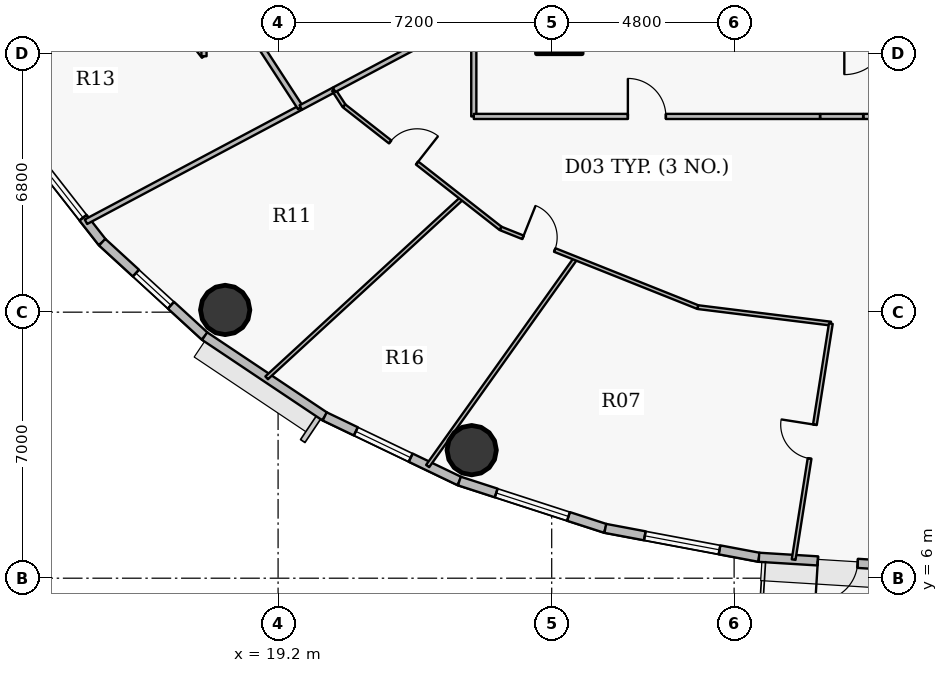
"""IFC4 building model, lengths in metres.
Left out: names, types, materials, properties, quantities, classifications, styles, units other than length and angle.
Written with IfcOpenShell. Run it as: python <this file> out.ifc"""

import sys

from ifc_helpers import new_model, si_unit, direction, frame, frame_2d, origin, origin_2d, place, context, subcontext, project, spatial, rectangle, hollow_circle, extrude, source, transform, mapped, element, fill, save


model = new_model("IFC4")
c1 = context("Model", 3, precision=1e-05, world=origin(), true_north=direction((0.0, 1.0)))
c2 = subcontext(c1, "Body", "Model", "MODEL_VIEW")
j1 = project(units=[si_unit("LENGTHUNIT", "METRE"), si_unit("PLANEANGLEUNIT", "RADIAN")], contexts=[c1])
p1 = place(None, origin())
s1 = spatial("IfcSite", under=j1, at=p1, CompositionType="ELEMENT")
p2 = place(p1, origin())
s2 = spatial("IfcBuilding", under=s1, at=p2, CompositionType="ELEMENT")
p3 = place(p2, frame((0.0, 0.0, 201.15)))
s3 = spatial("IfcBuildingStorey", under=s2, at=p3, CompositionType="ELEMENT", Elevation=201.15)
p4 = place(p3, frame((26.6, 20.4, 0.0), z_axis=(0.0, 0.0, 1.0), x_axis=(1.0, 0.0, 0.0)))
e1 = element("IfcColumn", 1, at=p4, inside=s3, PredefinedType="COLUMN", context=c2, shape_type="SweptSolid", body=[
    extrude(rectangle(XDim=1.2, YDim=1.2, at=origin_2d()), origin(), (0.0, 0.0, 1.0), 3.75),
])
for number, where, z_axis, x_axis in (
    (2, (17.808, 13.058, 0.0), (0.0, 0.0, 1.0), (1.0, 0.0, 0.0)),
    (3, (24.294, 9.369, 0.0), (0.0, 0.0, 1.0), (1.0, 0.0, 0.0)),
):
    element("IfcColumn", number, at=place(p3, frame(where, z_axis=z_axis, x_axis=x_axis)), inside=s3, PredefinedType="COLUMN", context=c2, shape_type="SweptSolid", body=[
        extrude(hollow_circle(Radius=0.65, WallThickness=0.04, at=origin_2d()), origin(), (0.0, 0.0, 1.0), 3.75),
    ])
p5 = place(p3, frame((14.572, 14.842, 0.0), z_axis=(0.0, 0.0, 1.0), x_axis=(-0.616287674549, 0.787521112224, 0.0)))
e4 = element("IfcWall", 4, at=p5, inside=s3, PredefinedType="SOLIDWALL", context=c2, shape_type="SweptSolid", body=[
    extrude(rectangle(XDim=3.517, YDim=0.24, at=frame_2d((1.759, 0.0))), origin(), (0.0, 0.0, 1.0), 3.45),
])
p6 = place(p5, frame((0.819, 0.0, 0.9)))
e5 = element("IfcOpeningElement", 5, at=p6, cuts=e4, PredefinedType="OPENING", context=c2, shape_type="SweptSolid", body=[
    extrude(rectangle(XDim=2.0, YDim=1.75, at=origin_2d()), frame((1.0, 0.13, 0.875), z_axis=(0.0, -1.0, 0.0), x_axis=(1.0, 0.0, 0.0)), (0.0, 0.0, 1.0), 0.26),
])
p7 = place(p3, frame((17.268, 12.369, 0.0), z_axis=(0.0, 0.0, 1.0), x_axis=(-0.737076565834, 0.675809245349, 0.0)))
e6 = element("IfcWall", 6, at=p7, inside=s3, PredefinedType="SOLIDWALL", context=c2, shape_type="SweptSolid", body=[
    extrude(rectangle(XDim=3.658, YDim=0.24, at=frame_2d((1.829, 0.0))), origin(), (0.0, 0.0, 1.0), 3.45),
])
p8 = place(p7, frame((1.204, 0.0, 0.9)))
e7 = element("IfcOpeningElement", 7, at=p8, cuts=e6, PredefinedType="OPENING", context=c2, shape_type="SweptSolid", body=[
    extrude(rectangle(XDim=1.25, YDim=1.65, at=origin_2d()), frame((0.625, 0.13, 0.825), z_axis=(0.0, -1.0, 0.0), x_axis=(1.0, 0.0, 0.0)), (0.0, 0.0, 1.0), 0.26),
])
p9 = place(p3, frame((20.427, 10.257, 0.0), z_axis=(0.0, 0.0, 1.0), x_axis=(-0.831228998277, 0.555930168657, 0.0)))
e8 = element("IfcWall", 8, at=p9, inside=s3, PredefinedType="SOLIDWALL", context=c2, shape_type="SweptSolid", body=[
    extrude(rectangle(XDim=3.8, YDim=0.24, at=frame_2d((1.9, 0.0))), origin(), (0.0, 0.0, 1.0), 3.45),
])
p10 = place(p3, frame((23.97, 8.556, 0.0), z_axis=(0.0, 0.0, 1.0), x_axis=(-0.901564733809, 0.432644231155, 0.0)))
e9 = element("IfcWall", 9, at=p10, inside=s3, PredefinedType="SOLIDWALL", context=c2, shape_type="SweptSolid", body=[
    extrude(rectangle(XDim=3.93, YDim=0.24, at=frame_2d((1.965, 0.0))), origin(), (0.0, 0.0, 1.0), 3.45),
])
p11 = place(p10, frame((1.421, 0.0, 0.9)))
e10 = element("IfcOpeningElement", 10, at=p11, cuts=e9, PredefinedType="OPENING", context=c2, shape_type="SweptSolid", body=[
    extrude(rectangle(XDim=1.6, YDim=1.75, at=origin_2d()), frame((0.8, 0.13, 0.875), z_axis=(0.0, -1.0, 0.0), x_axis=(1.0, 0.0, 0.0)), (0.0, 0.0, 1.0), 0.26),
])
p12 = place(p3, frame((27.811, 7.311, 0.0), z_axis=(0.0, 0.0, 1.0), x_axis=(-0.951209870236, 0.30854462038, 0.0)))
e11 = element("IfcWall", 11, at=p12, inside=s3, PredefinedType="SOLIDWALL", context=c2, shape_type="SweptSolid", body=[
    extrude(rectangle(XDim=4.038, YDim=0.24, at=frame_2d((2.019, 0.0))), origin(), (0.0, 0.0, 1.0), 3.45),
])
p13 = place(p12, frame((1.019, 0.0, 0.9)))
e12 = element("IfcOpeningElement", 12, at=p13, cuts=e11, PredefinedType="OPENING", context=c2, shape_type="SweptSolid", body=[
    extrude(rectangle(XDim=2.0, YDim=1.75, at=origin_2d()), frame((1.0, 0.13, 0.875), z_axis=(0.0, -1.0, 0.0), x_axis=(1.0, 0.0, 0.0)), (0.0, 0.0, 1.0), 0.26),
])
p14 = place(p3, frame((31.854, 6.551, 0.0), z_axis=(0.0, 0.0, 1.0), x_axis=(-0.982788108205, 0.184736391573, 0.0)))
e13 = element("IfcWall", 13, at=p14, inside=s3, PredefinedType="SOLIDWALL", context=c2, shape_type="SweptSolid", body=[
    extrude(rectangle(XDim=4.114, YDim=0.24, at=frame_2d((2.057, 0.0))), origin(), (0.0, 0.0, 1.0), 3.45),
])
p15 = place(p14, frame((1.057, 0.0, 0.9)))
e14 = element("IfcOpeningElement", 14, at=p15, cuts=e13, PredefinedType="OPENING", context=c2, shape_type="SweptSolid", body=[
    extrude(rectangle(XDim=2.0, YDim=1.75, at=origin_2d()), frame((1.0, 0.13, 0.875), z_axis=(0.0, -1.0, 0.0), x_axis=(1.0, 0.0, 0.0)), (0.0, 0.0, 1.0), 0.26),
])
p16 = place(p3, frame((36.0, 6.295, 0.0), z_axis=(0.0, 0.0, 1.0), x_axis=(-0.998104600619, 0.061540281305, 0.0)))
e15 = element("IfcWall", 15, at=p16, inside=s3, PredefinedType="SOLIDWALL", context=c2, shape_type="SweptSolid", body=[
    extrude(rectangle(XDim=4.154, YDim=0.24, at=frame_2d((2.077, 0.0))), origin(), (0.0, 0.0, 1.0), 3.45),
])
p17 = place(p16, frame((1.552, 0.0, 0.0)))
e16 = element("IfcOpeningElement", 16, at=p17, cuts=e15, PredefinedType="OPENING", context=c2, shape_type="SweptSolid", body=[
    extrude(rectangle(XDim=1.05, YDim=2.15, at=origin_2d()), frame((0.525, 0.13, 1.075), z_axis=(0.0, -1.0, 0.0), x_axis=(1.0, 0.0, 0.0)), (0.0, 0.0, 1.0), 0.26),
])
p18 = place(p3, frame((14.145, 15.379, 0.0), z_axis=(0.0, 0.0, 1.0), x_axis=(0.882932689309, 0.469499591214, 0.0)))
e17 = element("IfcWall", 17, at=p18, inside=s3, PredefinedType="PARTITIONING", context=c2, shape_type="SweptSolid", body=[
    extrude(rectangle(XDim=6.392, YDim=0.135, at=frame_2d((3.196, 0.0))), origin(), (0.0, 0.0, 1.0), 2.885),
])
p19 = place(p3, frame((16.72, 20.411, 0.0), z_axis=(0.0, 0.0, 1.0), x_axis=(0.616377221056, -0.787451027914, 0.0)))
e18 = element("IfcWall", 18, at=p19, inside=s3, PredefinedType="PARTITIONING", context=c2, shape_type="SweptSolid", body=[
    extrude(rectangle(XDim=0.859, YDim=0.135, at=frame_2d((0.43, 0.0))), origin(), (0.0, 0.0, 1.0), 3.45),
])
p20 = place(p3, frame((17.25, 19.734, 0.0), z_axis=(0.0, 0.0, 1.0), x_axis=(0.0, 1.0, 0.0)))
e19 = element("IfcWall", 19, at=p20, inside=s3, PredefinedType="PARTITIONING", context=c2, shape_type="SweptSolid", body=[
    extrude(rectangle(XDim=2.548, YDim=0.135, at=frame_2d((1.274, 0.0))), origin(), (0.0, 0.0, 1.0), 2.885),
])
p21 = place(p20, frame((0.864, 0.0, 0.0)))
e20 = element("IfcOpeningElement", 20, at=p21, cuts=e19, PredefinedType="OPENING", context=c2, shape_type="SweptSolid", body=[
    extrude(rectangle(XDim=0.82, YDim=2.1, at=origin_2d()), frame((0.41, 0.078, 1.05), z_axis=(0.0, -1.0, 0.0), x_axis=(1.0, 0.0, 0.0)), (0.0, 0.0, 1.0), 0.155),
])
p22 = place(p3, frame((17.279, 22.237, 0.0), z_axis=(0.0, 0.0, 1.0), x_axis=(0.545383699519, -0.83818650687, 0.0)))
e21 = element("IfcWall", 21, at=p22, inside=s3, PredefinedType="PARTITIONING", context=c2, shape_type="SweptSolid", body=[
    extrude(rectangle(XDim=4.601, YDim=0.15, at=frame_2d((2.3, 0.0))), origin(), (0.0, 0.0, 1.0), 2.885),
])
p23 = place(p3, frame((18.899, 11.272, 0.0), z_axis=(0.0, 0.0, 1.0), x_axis=(0.736047362481, 0.676930040834, 0.0)))
e22 = element("IfcWall", 22, at=p23, inside=s3, PredefinedType="PARTITIONING", context=c2, shape_type="SweptSolid", body=[
    extrude(rectangle(XDim=6.983, YDim=0.1, at=frame_2d((3.492, 0.0))), origin(), (0.0, 0.0, 1.0), 2.885),
])
p24 = place(p3, frame((19.798, 18.385, 0.0), z_axis=(0.0, 0.0, 1.0), x_axis=(0.882964446326, 0.469439864652, 0.0)))
e23 = element("IfcWall", 23, at=p24, inside=s3, PredefinedType="PARTITIONING", context=c2, shape_type="SweptSolid", body=[
    extrude(rectangle(XDim=0.982, YDim=0.135, at=frame_2d((0.491, 0.0))), origin(), (0.0, 0.0, 1.0), 3.45),
])
p25 = place(p3, frame((20.665, 18.846, 0.0), z_axis=(0.0, 0.0, 1.0), x_axis=(0.545143704476, -0.838342615802, 0.0)))
e24 = element("IfcWall", 24, at=p25, inside=s3, PredefinedType="PARTITIONING", context=c2, shape_type="SweptSolid", body=[
    extrude(rectangle(XDim=0.497, YDim=0.1, at=frame_2d((0.249, 0.0))), origin(), (0.0, 0.0, 1.0), 3.45),
])
p26 = place(p3, frame((20.674, 18.851, 0.0), z_axis=(0.0, 0.0, 1.0), x_axis=(0.882934968765, 0.469495304483, 0.0)))
e25 = element("IfcWall", 25, at=p26, inside=s3, PredefinedType="PARTITIONING", context=c2, shape_type="SweptSolid", body=[
    extrude(rectangle(XDim=4.164, YDim=0.135, at=frame_2d((2.082, 0.0))), origin(), (0.0, 0.0, 1.0), 3.45),
])
p27 = place(p3, frame((20.936, 18.429, 0.0), z_axis=(0.0, 0.0, 1.0), x_axis=(0.787322805473, -0.61654099619, 0.0)))
e26 = element("IfcWall", 26, at=p27, inside=s3, PredefinedType="PARTITIONING", context=c2, shape_type="SweptSolid", body=[
    extrude(rectangle(XDim=5.232, YDim=0.1, at=frame_2d((2.616, 0.0))), origin(), (0.0, 0.0, 1.0), 2.885),
])
p28 = place(p27, frame((1.541, 0.0, 0.0)))
e27 = element("IfcOpeningElement", 27, at=p28, cuts=e26, PredefinedType="OPENING", context=c2, shape_type="SweptSolid", body=[
    extrude(rectangle(XDim=0.9, YDim=2.1, at=origin_2d()), frame((0.45, 0.06, 1.05), z_axis=(0.0, -1.0, 0.0), x_axis=(1.0, 0.0, 0.0)), (0.0, 0.0, 1.0), 0.12),
])
p29 = place(p3, frame((23.136, 8.951, 0.0), z_axis=(0.0, 0.0, 1.0), x_axis=(0.580415349728, 0.814320589081, 0.0)))
e28 = element("IfcWall", 28, at=p29, inside=s3, PredefinedType="PARTITIONING", context=c2, shape_type="SweptSolid", body=[
    extrude(rectangle(XDim=6.71, YDim=0.1, at=frame_2d((3.355, 0.0))), origin(), (0.0, 0.0, 1.0), 2.885),
])
p30 = place(p3, frame((24.35, 18.15, 0.0), z_axis=(0.0, 0.0, 1.0), x_axis=(0.0, 1.0, 0.0)))
e29 = element("IfcWall", 29, at=p30, inside=s3, PredefinedType="PARTITIONING", context=c2, shape_type="SweptSolid", body=[
    extrude(rectangle(XDim=5.963, YDim=0.135, at=frame_2d((2.981, 0.0))), origin(), (0.0, 0.0, 1.0), 2.885),
])
p31 = place(p30, frame((3.879, 0.0, 0.0)))
e30 = element("IfcOpeningElement", 30, at=p31, cuts=e29, PredefinedType="OPENING", context=c2, shape_type="SweptSolid", body=[
    extrude(rectangle(XDim=0.82, YDim=2.1, at=origin_2d()), frame((0.41, 0.078, 1.05), z_axis=(0.0, -1.0, 0.0), x_axis=(1.0, 0.0, 0.0)), (0.0, 0.0, 1.0), 0.155),
])
p32 = place(p3, frame((24.35, 18.15, 0.0), z_axis=(0.0, 0.0, 1.0), x_axis=(1.0, 0.0, 0.0)))
e31 = element("IfcWall", 31, at=p32, inside=s3, PredefinedType="PARTITIONING", context=c2, shape_type="SweptSolid", body=[
    extrude(rectangle(XDim=9.109, YDim=0.135, at=frame_2d((4.554, 0.0))), origin(), (0.0, 0.0, 1.0), 2.885),
])
p33 = place(p32, frame((4.054, 0.0, 0.0)))
e32 = element("IfcOpeningElement", 32, at=p33, cuts=e31, PredefinedType="OPENING", context=c2, shape_type="SweptSolid", body=[
    extrude(rectangle(XDim=1.0, YDim=2.15, at=origin_2d()), frame((0.5, 0.078, 1.075), z_axis=(0.0, -1.0, 0.0), x_axis=(1.0, 0.0, 0.0)), (0.0, 0.0, 1.0), 0.155),
])
p34 = place(p3, frame((25.055, 15.204, 0.0), z_axis=(0.0, 0.0, 1.0), x_axis=(0.928798710424, -0.370584613166, 0.0)))
e33 = element("IfcWall", 33, at=p34, inside=s3, PredefinedType="PARTITIONING", context=c2, shape_type="SweptSolid", body=[
    extrude(rectangle(XDim=5.589, YDim=0.1, at=frame_2d((2.794, 0.0))), origin(), (0.0, 0.0, 1.0), 2.885),
])
p35 = place(p34, frame((0.633, 0.0, 0.0)))
e34 = element("IfcOpeningElement", 34, at=p35, cuts=e33, PredefinedType="OPENING", context=c2, shape_type="SweptSolid", body=[
    extrude(rectangle(XDim=0.9, YDim=2.1, at=origin_2d()), frame((0.45, 0.06, 1.05), z_axis=(0.0, -1.0, 0.0), x_axis=(1.0, 0.0, 0.0)), (0.0, 0.0, 1.0), 0.12),
])
p36 = place(p3, frame((30.246, 13.133, 0.0), z_axis=(0.0, 0.0, 1.0), x_axis=(0.992402005927, -0.123037630959, 0.0)))
e35 = element("IfcWall", 35, at=p36, inside=s3, PredefinedType="PARTITIONING", context=c2, shape_type="SweptSolid", body=[
    extrude(rectangle(XDim=3.526, YDim=0.1, at=frame_2d((1.763, 0.0))), origin(), (0.0, 0.0, 1.0), 3.45),
])
p37 = place(p3, frame((32.766, 6.489, 0.0), z_axis=(0.0, 0.0, 1.0), x_axis=(0.155739200194, 0.987798208909, 0.0)))
e36 = element("IfcWall", 36, at=p37, inside=s3, PredefinedType="PARTITIONING", context=c2, shape_type="SweptSolid", body=[
    extrude(rectangle(XDim=6.286, YDim=0.1, at=frame_2d((3.143, 0.0))), origin(), (0.0, 0.0, 1.0), 2.885),
])
p38 = place(p37, frame((2.693, 0.0, 0.0)))
e37 = element("IfcOpeningElement", 37, at=p38, cuts=e36, PredefinedType="OPENING", context=c2, shape_type="SweptSolid", body=[
    extrude(rectangle(XDim=0.9, YDim=2.1, at=origin_2d()), frame((0.45, 0.06, 1.05), z_axis=(0.0, -1.0, 0.0), x_axis=(1.0, 0.0, 0.0)), (0.0, 0.0, 1.0), 0.12),
])
p39 = place(p3, frame((34.605, 18.15, 0.0), z_axis=(0.0, 0.0, 1.0), x_axis=(1.0, 0.0, 0.0)))
e38 = element("IfcWall", 38, at=p39, inside=s3, PredefinedType="PARTITIONING", context=c2, shape_type="SweptSolid", body=[
    extrude(rectangle(XDim=13.595, YDim=0.135, at=frame_2d((6.798, 0.0))), origin(), (0.0, 0.0, 1.0), 2.885),
])
p40 = place(p3, frame((34.595, 18.15, 0.0), z_axis=(0.0, 0.0, 1.0), x_axis=(-1.0, 0.0, 0.0)))
e39 = element("IfcWall", 39, at=p40, inside=s3, PredefinedType="PARTITIONING", context=c2, shape_type="SweptSolid", body=[
    extrude(rectangle(XDim=1.126, YDim=0.135, at=frame_2d((0.563, 0.0))), origin(), (0.0, 0.0, 1.0), 3.45),
])
m1 = source(origin(), c2, "Body", "SweptSolid", [
    extrude(rectangle(XDim=2.0, YDim=1.75, at=origin_2d()), frame((1.0, 0.03, 0.875), z_axis=(0.0, -1.0, 0.0), x_axis=(1.0, 0.0, 0.0)), (0.0, 0.0, 1.0), 0.06),
])
p41 = place(p6, origin())
e40 = element("IfcWindow", 40, at=p41, inside=s3, PartitioningType="DOUBLE_PANEL_VERTICAL", PredefinedType="WINDOW", context=c2, shape_type="MappedRepresentation", body=[
    mapped(m1, transform((0.0, 0.0, 0.0), x_axis=(1.0, 0.0, 0.0), y_axis=(0.0, 1.0, 0.0), z_axis=(0.0, 0.0, 1.0), scale=1.0)),
])
fill(e5, e40)
m2 = source(origin(), c2, "Body", "SweptSolid", [
    extrude(rectangle(XDim=1.6, YDim=1.75, at=origin_2d()), frame((0.8, 0.03, 0.875), z_axis=(0.0, -1.0, 0.0), x_axis=(1.0, 0.0, 0.0)), (0.0, 0.0, 1.0), 0.06),
])
p42 = place(p11, origin())
e41 = element("IfcWindow", 41, at=p42, inside=s3, PartitioningType="DOUBLE_PANEL_VERTICAL", PredefinedType="WINDOW", context=c2, shape_type="MappedRepresentation", body=[
    mapped(m2, transform((0.0, 0.0, 0.0), x_axis=(1.0, 0.0, 0.0), y_axis=(0.0, 1.0, 0.0), z_axis=(0.0, 0.0, 1.0), scale=1.0)),
])
fill(e10, e41)
p43 = place(p13, origin())
e42 = element("IfcWindow", 42, at=p43, inside=s3, PartitioningType="DOUBLE_PANEL_VERTICAL", PredefinedType="WINDOW", context=c2, shape_type="MappedRepresentation", body=[
    mapped(m1, transform((0.0, 0.0, 0.0), x_axis=(1.0, 0.0, 0.0), y_axis=(0.0, 1.0, 0.0), z_axis=(0.0, 0.0, 1.0), scale=1.0)),
])
fill(e12, e42)
p44 = place(p15, origin())
e43 = element("IfcWindow", 43, at=p44, inside=s3, PartitioningType="DOUBLE_PANEL_VERTICAL", PredefinedType="WINDOW", context=c2, shape_type="MappedRepresentation", body=[
    mapped(m1, transform((0.0, 0.0, 0.0), x_axis=(1.0, 0.0, 0.0), y_axis=(0.0, 1.0, 0.0), z_axis=(0.0, 0.0, 1.0), scale=1.0)),
])
fill(e14, e43)
m3 = source(origin(), c2, "Body", "SweptSolid", [
    extrude(rectangle(XDim=1.05, YDim=2.15, at=origin_2d()), frame((0.525, 0.025, 1.075), z_axis=(0.0, -1.0, 0.0), x_axis=(1.0, 0.0, 0.0)), (0.0, 0.0, 1.0), 0.05),
])
p45 = place(p17, origin())
e44 = element("IfcDoor", 44, at=p45, inside=s3, OperationType="SINGLE_SWING_RIGHT", PredefinedType="DOOR", context=c2, shape_type="MappedRepresentation", body=[
    mapped(m3, transform((0.0, 0.0, 0.0), x_axis=(1.0, 0.0, 0.0), y_axis=(0.0, 1.0, 0.0), z_axis=(0.0, 0.0, 1.0), scale=1.0)),
])
fill(e16, e44)
m4 = source(origin(), c2, "Body", "SweptSolid", [
    extrude(rectangle(XDim=1.25, YDim=1.65, at=origin_2d()), frame((0.625, 0.03, 0.825), z_axis=(0.0, -1.0, 0.0), x_axis=(1.0, 0.0, 0.0)), (0.0, 0.0, 1.0), 0.06),
])
p46 = place(p8, origin())
e45 = element("IfcWindow", 45, at=p46, inside=s3, PartitioningType="SINGLE_PANEL", PredefinedType="WINDOW", context=c2, shape_type="MappedRepresentation", body=[
    mapped(m4, transform((0.0, 0.0, 0.0), x_axis=(1.0, 0.0, 0.0), y_axis=(0.0, 1.0, 0.0), z_axis=(0.0, 0.0, 1.0), scale=1.0)),
])
fill(e7, e45)
m5 = source(origin(), c2, "Body", "SweptSolid", [
    extrude(rectangle(XDim=1.0, YDim=2.15, at=origin_2d()), frame((0.5, 0.025, 1.075), z_axis=(0.0, -1.0, 0.0), x_axis=(1.0, 0.0, 0.0)), (0.0, 0.0, 1.0), 0.05),
])
p47 = place(p33, origin())
e46 = element("IfcDoor", 46, at=p47, inside=s3, OperationType="SINGLE_SWING_LEFT", PredefinedType="DOOR", context=c2, shape_type="MappedRepresentation", body=[
    mapped(m5, transform((0.0, 0.0, 0.0), x_axis=(1.0, 0.0, 0.0), y_axis=(0.0, 1.0, 0.0), z_axis=(0.0, 0.0, 1.0), scale=1.0)),
])
fill(e32, e46)
m6 = source(origin(), c2, "Body", "SweptSolid", [
    extrude(rectangle(XDim=0.9, YDim=2.1, at=origin_2d()), frame((0.45, 0.025, 1.05), z_axis=(0.0, -1.0, 0.0), x_axis=(1.0, 0.0, 0.0)), (0.0, 0.0, 1.0), 0.05),
])
p48 = place(p28, origin())
e47 = element("IfcDoor", 47, at=p48, inside=s3, OperationType="SINGLE_SWING_RIGHT", PredefinedType="DOOR", context=c2, shape_type="MappedRepresentation", body=[
    mapped(m6, transform((0.0, 0.0, 0.0), x_axis=(1.0, 0.0, 0.0), y_axis=(0.0, 1.0, 0.0), z_axis=(0.0, 0.0, 1.0), scale=1.0)),
])
fill(e27, e47)
p49 = place(p35, origin())
e48 = element("IfcDoor", 48, at=p49, inside=s3, OperationType="SINGLE_SWING_LEFT", PredefinedType="DOOR", context=c2, shape_type="MappedRepresentation", body=[
    mapped(m6, transform((0.0, 0.0, 0.0), x_axis=(1.0, 0.0, 0.0), y_axis=(0.0, 1.0, 0.0), z_axis=(0.0, 0.0, 1.0), scale=1.0)),
])
fill(e34, e48)
p50 = place(p38, origin())
e49 = element("IfcDoor", 49, at=p50, inside=s3, OperationType="SINGLE_SWING_RIGHT", PredefinedType="DOOR", context=c2, shape_type="MappedRepresentation", body=[
    mapped(m6, transform((0.0, 0.0, 0.0), x_axis=(1.0, 0.0, 0.0), y_axis=(0.0, 1.0, 0.0), z_axis=(0.0, 0.0, 1.0), scale=1.0)),
])
fill(e37, e49)
save(model, sys.argv[1])
